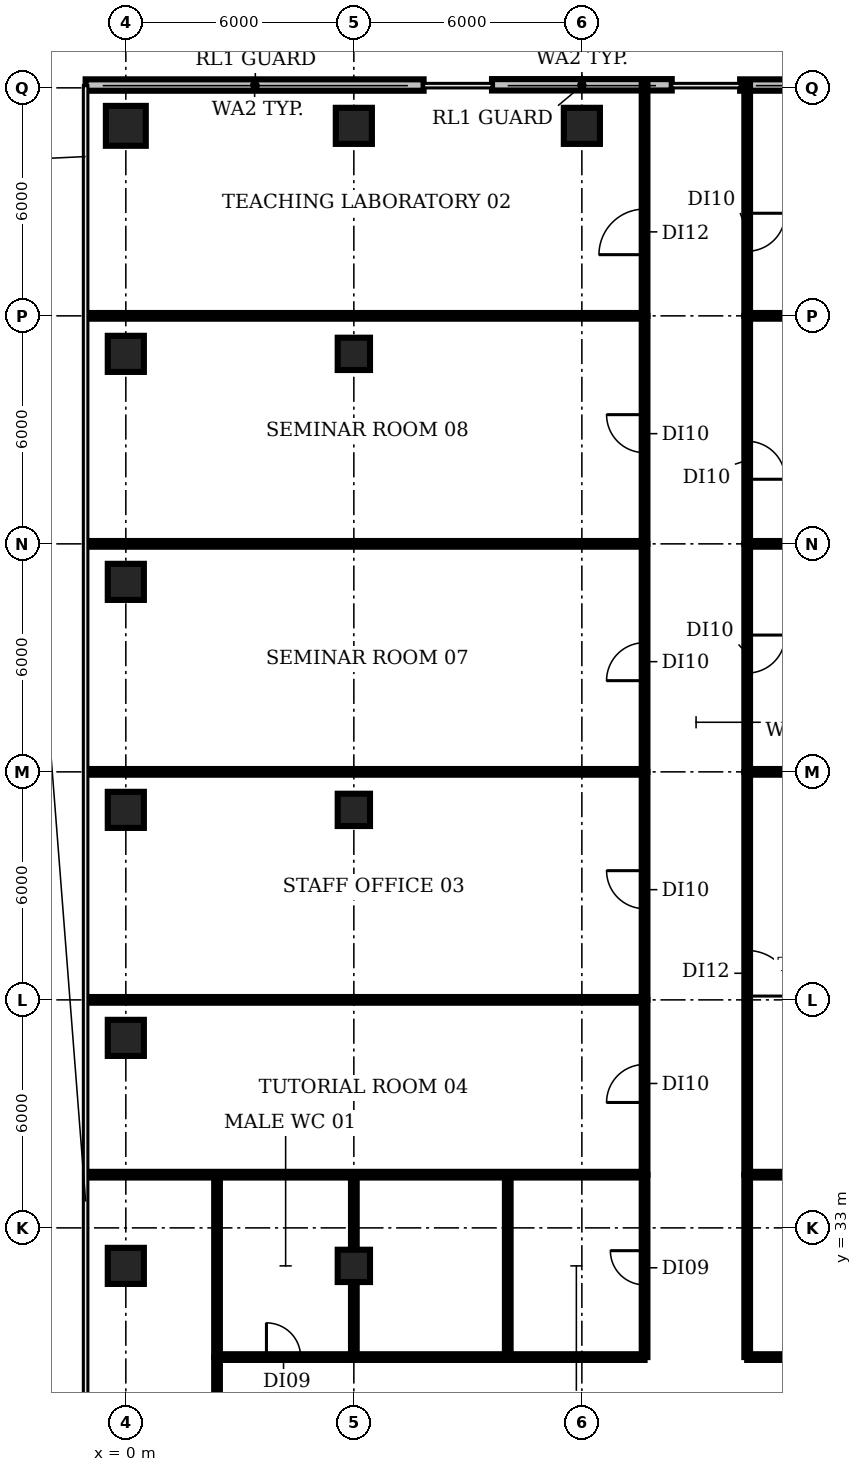
"""IFC4 building model, lengths in metres.
Left out: names, types, materials, properties, quantities, classifications, styles, units other than length and angle.
Written with IfcOpenShell. Run it as: python <this file> out.ifc"""

import sys

from ifc_helpers import new_model, si_unit, direction, frame, frame_2d, origin, origin_2d, place, context, subcontext, project, spatial, rectangle, circle, extrude, element, fill, save


model = new_model("IFC4")
c1 = context("Model", 3, precision=1e-05, world=origin(), true_north=direction((0.0, 1.0)))
c2 = subcontext(c1, "Body", "Model", "MODEL_VIEW")
j1 = project(units=[si_unit("LENGTHUNIT", "METRE"), si_unit("PLANEANGLEUNIT", "RADIAN")], contexts=[c1])
p1 = place(None, origin())
s1 = spatial("IfcSite", under=j1, at=p1, CompositionType="ELEMENT")
p2 = place(p1, origin())
s2 = spatial("IfcBuilding", under=s1, at=p2, CompositionType="ELEMENT")
p3 = place(p2, frame((0.0, 0.0, 66.8)))
s3 = spatial("IfcBuildingStorey", under=s2, at=p3, CompositionType="ELEMENT", Elevation=66.8)
for number, where, z_axis, x_axis in (
    (1, (0.0, 32.0, 0.0), (0.0, 0.0, 1.0), (1.0, 0.0, 0.0)),
    (2, (0.0, 38.0, 0.0), (0.0, 0.0, 1.0), (1.0, 0.0, 0.0)),
    (3, (0.0, 44.0, 0.0), (0.0, 0.0, 1.0), (1.0, 0.0, 0.0)),
    (4, (0.0, 50.0, 0.0), (0.0, 0.0, 1.0), (1.0, 0.0, 0.0)),
    (5, (0.0, 56.0, 0.0), (0.0, 0.0, 1.0), (1.0, 0.0, 0.0)),
):
    element("IfcColumn", number, at=place(p3, frame(where, z_axis=z_axis, x_axis=x_axis)), inside=s3, PredefinedType="COLUMN", context=c2, shape_type="SweptSolid", body=[
        extrude(rectangle(XDim=0.95, YDim=0.95, at=origin_2d()), origin(), (0.0, 0.0, 1.0), 3.85),
    ])
p4 = place(p3, frame((0.0, 62.0, 0.0), z_axis=(0.0, 0.0, 1.0), x_axis=(1.0, 0.0, 0.0)))
e6 = element("IfcColumn", 6, at=p4, inside=s3, PredefinedType="COLUMN", context=c2, shape_type="SweptSolid", body=[
    extrude(circle(Radius=0.525, at=origin_2d()), origin(), (0.0, 0.0, 1.0), 3.85),
])
for number, where, z_axis, x_axis in (
    (7, (6.0, 32.0, 0.0), (0.0, 0.0, 1.0), (1.0, 0.0, 0.0)),
    (8, (6.0, 44.0, 0.0), (0.0, 0.0, 1.0), (1.0, 0.0, 0.0)),
    (9, (6.0, 56.0, 0.0), (0.0, 0.0, 1.0), (1.0, 0.0, 0.0)),
):
    element("IfcColumn", number, at=place(p3, frame(where, z_axis=z_axis, x_axis=x_axis)), inside=s3, PredefinedType="COLUMN", context=c2, shape_type="SweptSolid", body=[
        extrude(rectangle(XDim=0.85, YDim=0.85, at=origin_2d()), origin(), (0.0, 0.0, 1.0), 3.85),
    ])
for number, where, z_axis, x_axis in (
    (10, (6.0, 62.0, 0.0), (0.0, 0.0, 1.0), (1.0, 0.0, 0.0)),
    (11, (12.0, 62.0, 0.0), (0.0, 0.0, 1.0), (1.0, 0.0, 0.0)),
):
    element("IfcColumn", number, at=place(p3, frame(where, z_axis=z_axis, x_axis=x_axis)), inside=s3, PredefinedType="COLUMN", context=c2, shape_type="SweptSolid", body=[
        extrude(rectangle(XDim=0.95, YDim=0.95, at=origin_2d()), origin(), (0.0, 0.0, 1.0), 3.85),
    ])
p5 = place(p3, frame((25.058, 63.074, 0.0), z_axis=(0.0, 0.0, 1.0), x_axis=(-1.0, 0.0, 0.0)))
e12 = element("IfcWall", 12, at=p5, inside=s3, PredefinedType="SOLIDWALL", context=c2, shape_type="SweptSolid", body=[
    extrude(rectangle(XDim=8.894, YDim=0.3, at=frame_2d((4.447, 0.0))), origin(), (0.0, 0.0, 1.0), 3.85),
])
p6 = place(p3, frame((14.365, 63.08, 0.0), z_axis=(0.0, 0.0, 1.0), x_axis=(-1.0, 0.0, 0.0)))
e13 = element("IfcWall", 13, at=p6, inside=s3, PredefinedType="SOLIDWALL", context=c2, shape_type="SweptSolid", body=[
    extrude(rectangle(XDim=4.729, YDim=0.3, at=frame_2d((2.365, 0.0))), origin(), (0.0, 0.0, 1.0), 3.85),
])
p7 = place(p3, frame((7.835, 63.074, 0.0), z_axis=(0.0, 0.0, 1.0), x_axis=(-1.0, 0.0, 0.0)))
e14 = element("IfcWall", 14, at=p7, inside=s3, PredefinedType="SOLIDWALL", context=c2, shape_type="SweptSolid", body=[
    extrude(rectangle(XDim=8.894, YDim=0.3, at=frame_2d((4.447, 0.0))), origin(), (0.0, 0.0, 1.0), 3.85),
])
for number, where, z_axis, x_axis in (
    (15, (-1.01, 34.4, 0.0), (0.0, 0.0, 1.0), (1.0, 0.0, 0.0)),
    (16, (-1.01, 39.0, 0.0), (0.0, 0.0, 1.0), (1.0, 0.0, 0.0)),
    (17, (-1.01, 45.0, 0.0), (0.0, 0.0, 1.0), (1.0, 0.0, 0.0)),
    (18, (-1.01, 51.0, 0.0), (0.0, 0.0, 1.0), (1.0, 0.0, 0.0)),
):
    element("IfcWall", number, at=place(p3, frame(where, z_axis=z_axis, x_axis=x_axis)), inside=s3, PredefinedType="PARTITIONING", context=c2, shape_type="SweptSolid", body=[
        extrude(rectangle(XDim=14.66, YDim=0.15, at=frame_2d((7.33, 0.0))), origin(), (0.0, 0.0, 1.0), 2.83),
    ])
p8 = place(p3, frame((-0.993, 57.0, 0.0), z_axis=(0.0, 0.0, 1.0), x_axis=(1.0, 0.0, 0.0)))
e19 = element("IfcWall", 19, at=p8, inside=s3, PredefinedType="PARTITIONING", context=c2, shape_type="SweptSolid", body=[
    extrude(rectangle(XDim=14.643, YDim=0.15, at=frame_2d((7.321, 0.0))), origin(), (0.0, 0.0, 1.0), 2.83),
])
p9 = place(p3, frame((2.4, 25.7, 0.0), z_axis=(0.0, 0.0, 1.0), x_axis=(0.0, 1.0, 0.0)))
e20 = element("IfcWall", 20, at=p9, inside=s3, PredefinedType="PARTITIONING", context=c2, shape_type="SweptSolid", body=[
    extrude(rectangle(XDim=3.9, YDim=0.15, at=frame_2d((1.95, 0.0))), origin(), (0.0, 0.0, 1.0), 2.83),
])
p10 = place(p3, frame((2.4, 29.6, 0.0), z_axis=(0.0, 0.0, 1.0), x_axis=(0.0, 1.0, 0.0)))
e21 = element("IfcWall", 21, at=p10, inside=s3, PredefinedType="PARTITIONING", context=c2, shape_type="SweptSolid", body=[
    extrude(rectangle(XDim=4.8, YDim=0.15, at=frame_2d((2.4, 0.0))), origin(), (0.0, 0.0, 1.0), 2.83),
])
p11 = place(p3, frame((2.4, 29.6, 0.0), z_axis=(0.0, 0.0, 1.0), x_axis=(1.0, 0.0, 0.0)))
e22 = element("IfcWall", 22, at=p11, inside=s3, PredefinedType="PARTITIONING", context=c2, shape_type="SweptSolid", body=[
    extrude(rectangle(XDim=3.6, YDim=0.15, at=frame_2d((1.8, 0.0))), origin(), (0.0, 0.0, 1.0), 2.83),
])
p12 = place(p11, frame((1.3, 0.0, 0.0)))
e23 = element("IfcOpeningElement", 23, at=p12, cuts=e22, PredefinedType="OPENING", context=c2, shape_type="SweptSolid", body=[
    extrude(rectangle(XDim=0.9, YDim=2.1, at=frame_2d((0.45, 1.05))), frame((0.0, 0.085, 0.0), z_axis=(0.0, -1.0, 0.0), x_axis=(1.0, 0.0, 0.0)), (0.0, 0.0, 1.0), 0.17),
])
p13 = place(p3, frame((6.0, 29.6, 0.0), z_axis=(0.0, 0.0, 1.0), x_axis=(0.0, 1.0, 0.0)))
e24 = element("IfcWall", 24, at=p13, inside=s3, PredefinedType="PARTITIONING", context=c2, shape_type="SweptSolid", body=[
    extrude(rectangle(XDim=4.8, YDim=0.15, at=frame_2d((2.4, 0.0))), origin(), (0.0, 0.0, 1.0), 2.83),
])
p14 = place(p3, frame((6.0, 29.6, 0.0), z_axis=(0.0, 0.0, 1.0), x_axis=(1.0, 0.0, 0.0)))
e25 = element("IfcWall", 25, at=p14, inside=s3, PredefinedType="PARTITIONING", context=c2, shape_type="SweptSolid", body=[
    extrude(rectangle(XDim=7.65, YDim=0.15, at=frame_2d((3.825, 0.0))), origin(), (0.0, 0.0, 1.0), 2.83),
])
p15 = place(p3, frame((10.05, 29.6, 0.0), z_axis=(0.0, 0.0, 1.0), x_axis=(0.0, 1.0, 0.0)))
e26 = element("IfcWall", 26, at=p15, inside=s3, PredefinedType="PARTITIONING", context=c2, shape_type="SweptSolid", body=[
    extrude(rectangle(XDim=4.8, YDim=0.15, at=frame_2d((2.4, 0.0))), origin(), (0.0, 0.0, 1.0), 2.83),
])
p16 = place(p3, frame((13.65, 29.6, 0.0), z_axis=(0.0, 0.0, 1.0), x_axis=(0.0, 1.0, 0.0)))
e27 = element("IfcWall", 27, at=p16, inside=s3, PredefinedType="PARTITIONING", context=c2, shape_type="SweptSolid", body=[
    extrude(rectangle(XDim=4.8, YDim=0.15, at=frame_2d((2.4, 0.0))), origin(), (0.0, 0.0, 1.0), 2.83),
])
p17 = place(p16, frame((1.9, 0.0, 0.0)))
e28 = element("IfcOpeningElement", 28, at=p17, cuts=e27, PredefinedType="OPENING", context=c2, shape_type="SweptSolid", body=[
    extrude(rectangle(XDim=0.9, YDim=2.1, at=frame_2d((0.45, 1.05))), frame((0.0, 0.085, 0.0), z_axis=(0.0, -1.0, 0.0), x_axis=(1.0, 0.0, 0.0)), (0.0, 0.0, 1.0), 0.17),
])
p18 = place(p3, frame((13.65, 34.4, 0.0), z_axis=(0.0, 0.0, 1.0), x_axis=(0.0, 1.0, 0.0)))
e29 = element("IfcWall", 29, at=p18, inside=s3, PredefinedType="PARTITIONING", context=c2, shape_type="SweptSolid", body=[
    extrude(rectangle(XDim=4.6, YDim=0.15, at=frame_2d((2.3, 0.0))), origin(), (0.0, 0.0, 1.0), 2.83),
])
p19 = place(p18, frame((1.9, 0.0, 0.0)))
e30 = element("IfcOpeningElement", 30, at=p19, cuts=e29, PredefinedType="OPENING", context=c2, shape_type="SweptSolid", body=[
    extrude(rectangle(XDim=1.0, YDim=2.1, at=frame_2d((0.5, 1.05))), frame((0.0, 0.085, 0.0), z_axis=(0.0, -1.0, 0.0), x_axis=(1.0, 0.0, 0.0)), (0.0, 0.0, 1.0), 0.17),
])
p20 = place(p3, frame((13.65, 39.0, 0.0), z_axis=(0.0, 0.0, 1.0), x_axis=(0.0, 1.0, 0.0)))
e31 = element("IfcWall", 31, at=p20, inside=s3, PredefinedType="PARTITIONING", context=c2, shape_type="SweptSolid", body=[
    extrude(rectangle(XDim=6.0, YDim=0.15, at=frame_2d((3.0, 0.0))), origin(), (0.0, 0.0, 1.0), 2.83),
])
p21 = place(p20, frame((2.4, 0.0, 0.0)))
e32 = element("IfcOpeningElement", 32, at=p21, cuts=e31, PredefinedType="OPENING", context=c2, shape_type="SweptSolid", body=[
    extrude(rectangle(XDim=1.0, YDim=2.1, at=frame_2d((0.5, 1.05))), frame((0.0, 0.085, 0.0), z_axis=(0.0, -1.0, 0.0), x_axis=(1.0, 0.0, 0.0)), (0.0, 0.0, 1.0), 0.17),
])
p22 = place(p3, frame((13.65, 45.0, 0.0), z_axis=(0.0, 0.0, 1.0), x_axis=(0.0, 1.0, 0.0)))
e33 = element("IfcWall", 33, at=p22, inside=s3, PredefinedType="PARTITIONING", context=c2, shape_type="SweptSolid", body=[
    extrude(rectangle(XDim=6.0, YDim=0.15, at=frame_2d((3.0, 0.0))), origin(), (0.0, 0.0, 1.0), 2.83),
])
p23 = place(p22, frame((2.4, 0.0, 0.0)))
e34 = element("IfcOpeningElement", 34, at=p23, cuts=e33, PredefinedType="OPENING", context=c2, shape_type="SweptSolid", body=[
    extrude(rectangle(XDim=1.0, YDim=2.1, at=frame_2d((0.5, 1.05))), frame((0.0, 0.085, 0.0), z_axis=(0.0, -1.0, 0.0), x_axis=(1.0, 0.0, 0.0)), (0.0, 0.0, 1.0), 0.17),
])
p24 = place(p3, frame((13.65, 51.0, 0.0), z_axis=(0.0, 0.0, 1.0), x_axis=(0.0, 1.0, 0.0)))
e35 = element("IfcWall", 35, at=p24, inside=s3, PredefinedType="PARTITIONING", context=c2, shape_type="SweptSolid", body=[
    extrude(rectangle(XDim=6.0, YDim=0.15, at=frame_2d((3.0, 0.0))), origin(), (0.0, 0.0, 1.0), 2.83),
])
p25 = place(p24, frame((2.4, 0.0, 0.0)))
e36 = element("IfcOpeningElement", 36, at=p25, cuts=e35, PredefinedType="OPENING", context=c2, shape_type="SweptSolid", body=[
    extrude(rectangle(XDim=1.0, YDim=2.1, at=frame_2d((0.5, 1.05))), frame((0.0, 0.085, 0.0), z_axis=(0.0, -1.0, 0.0), x_axis=(1.0, 0.0, 0.0)), (0.0, 0.0, 1.0), 0.17),
])
p26 = place(p3, frame((13.65, 57.0, 0.0), z_axis=(0.0, 0.0, 1.0), x_axis=(0.0, 1.0, 0.0)))
e37 = element("IfcWall", 37, at=p26, inside=s3, PredefinedType="PARTITIONING", context=c2, shape_type="SweptSolid", body=[
    extrude(rectangle(XDim=6.118, YDim=0.15, at=frame_2d((3.059, 0.0))), origin(), (0.0, 0.0, 1.0), 2.83),
])
p27 = place(p26, frame((1.61, 0.0, 0.0)))
e38 = element("IfcOpeningElement", 38, at=p27, cuts=e37, PredefinedType="OPENING", context=c2, shape_type="SweptSolid", body=[
    extrude(rectangle(XDim=1.2, YDim=2.1, at=frame_2d((0.6, 1.05))), frame((0.0, 0.085, 0.0), z_axis=(0.0, -1.0, 0.0), x_axis=(1.0, 0.0, 0.0)), (0.0, 0.0, 1.0), 0.17),
])
p28 = place(p3, frame((16.35, 29.6, 0.0), z_axis=(0.0, 0.0, 1.0), x_axis=(0.0, 1.0, 0.0)))
e39 = element("IfcWall", 39, at=p28, inside=s3, PredefinedType="PARTITIONING", context=c2, shape_type="SweptSolid", body=[
    extrude(rectangle(XDim=4.8, YDim=0.15, at=frame_2d((2.4, 0.0))), origin(), (0.0, 0.0, 1.0), 2.83),
])
p29 = place(p3, frame((16.35, 29.6, 0.0), z_axis=(0.0, 0.0, 1.0), x_axis=(1.0, 0.0, 0.0)))
e40 = element("IfcWall", 40, at=p29, inside=s3, PredefinedType="PARTITIONING", context=c2, shape_type="SweptSolid", body=[
    extrude(rectangle(XDim=5.06, YDim=0.15, at=frame_2d((2.53, 0.0))), origin(), (0.0, 0.0, 1.0), 2.83),
])
p30 = place(p3, frame((16.35, 34.4, 0.0), z_axis=(0.0, 0.0, 1.0), x_axis=(1.0, 0.0, 0.0)))
e41 = element("IfcWall", 41, at=p30, inside=s3, PredefinedType="PARTITIONING", context=c2, shape_type="SweptSolid", body=[
    extrude(rectangle(XDim=8.66, YDim=0.15, at=frame_2d((4.33, 0.0))), origin(), (0.0, 0.0, 1.0), 2.83),
])
p31 = place(p3, frame((16.35, 45.0, 0.0), z_axis=(0.0, 0.0, 1.0), x_axis=(0.0, -1.0, 0.0)))
e42 = element("IfcWall", 42, at=p31, inside=s3, PredefinedType="PARTITIONING", context=c2, shape_type="SweptSolid", body=[
    extrude(rectangle(XDim=10.6, YDim=0.15, at=frame_2d((5.3, 0.0))), origin(), (0.0, 0.0, 1.0), 2.83),
])
p32 = place(p31, frame((4.7, 0.0, 0.0)))
e43 = element("IfcOpeningElement", 43, at=p32, cuts=e42, PredefinedType="OPENING", context=c2, shape_type="SweptSolid", body=[
    extrude(rectangle(XDim=1.2, YDim=2.1, at=frame_2d((0.6, 1.05))), frame((0.0, 0.085, 0.0), z_axis=(0.0, -1.0, 0.0), x_axis=(1.0, 0.0, 0.0)), (0.0, 0.0, 1.0), 0.17),
])
p33 = place(p3, frame((16.35, 45.0, 0.0), z_axis=(0.0, 0.0, 1.0), x_axis=(1.0, 0.0, 0.0)))
e44 = element("IfcWall", 44, at=p33, inside=s3, PredefinedType="PARTITIONING", context=c2, shape_type="SweptSolid", body=[
    extrude(rectangle(XDim=8.66, YDim=0.15, at=frame_2d((4.33, 0.0))), origin(), (0.0, 0.0, 1.0), 2.83),
])
p34 = place(p3, frame((16.35, 51.0, 0.0), z_axis=(0.0, 0.0, 1.0), x_axis=(0.0, -1.0, 0.0)))
e45 = element("IfcWall", 45, at=p34, inside=s3, PredefinedType="PARTITIONING", context=c2, shape_type="SweptSolid", body=[
    extrude(rectangle(XDim=6.0, YDim=0.15, at=frame_2d((3.0, 0.0))), origin(), (0.0, 0.0, 1.0), 2.83),
])
p35 = place(p34, frame((2.4, 0.0, 0.0)))
e46 = element("IfcOpeningElement", 46, at=p35, cuts=e45, PredefinedType="OPENING", context=c2, shape_type="SweptSolid", body=[
    extrude(rectangle(XDim=1.0, YDim=2.1, at=frame_2d((0.5, 1.05))), frame((0.0, 0.085, 0.0), z_axis=(0.0, -1.0, 0.0), x_axis=(1.0, 0.0, 0.0)), (0.0, 0.0, 1.0), 0.17),
])
p36 = place(p3, frame((16.35, 51.0, 0.0), z_axis=(0.0, 0.0, 1.0), x_axis=(1.0, 0.0, 0.0)))
e47 = element("IfcWall", 47, at=p36, inside=s3, PredefinedType="PARTITIONING", context=c2, shape_type="SweptSolid", body=[
    extrude(rectangle(XDim=8.66, YDim=0.15, at=frame_2d((4.33, 0.0))), origin(), (0.0, 0.0, 1.0), 2.83),
])
p37 = place(p3, frame((16.35, 57.0, 0.0), z_axis=(0.0, 0.0, 1.0), x_axis=(0.0, -1.0, 0.0)))
e48 = element("IfcWall", 48, at=p37, inside=s3, PredefinedType="PARTITIONING", context=c2, shape_type="SweptSolid", body=[
    extrude(rectangle(XDim=6.0, YDim=0.15, at=frame_2d((3.0, 0.0))), origin(), (0.0, 0.0, 1.0), 2.83),
])
p38 = place(p37, frame((3.3, 0.0, 0.0)))
e49 = element("IfcOpeningElement", 49, at=p38, cuts=e48, PredefinedType="OPENING", context=c2, shape_type="SweptSolid", body=[
    extrude(rectangle(XDim=1.0, YDim=2.1, at=frame_2d((0.5, 1.05))), frame((0.0, 0.085, 0.0), z_axis=(0.0, -1.0, 0.0), x_axis=(1.0, 0.0, 0.0)), (0.0, 0.0, 1.0), 0.17),
])
p39 = place(p3, frame((16.35, 57.0, 0.0), z_axis=(0.0, 0.0, 1.0), x_axis=(1.0, 0.0, 0.0)))
e50 = element("IfcWall", 50, at=p39, inside=s3, PredefinedType="PARTITIONING", context=c2, shape_type="SweptSolid", body=[
    extrude(rectangle(XDim=8.643, YDim=0.15, at=frame_2d((4.321, 0.0))), origin(), (0.0, 0.0, 1.0), 2.83),
])
p40 = place(p3, frame((16.35, 63.118, 0.0), z_axis=(0.0, 0.0, 1.0), x_axis=(0.0, -1.0, 0.0)))
e51 = element("IfcWall", 51, at=p40, inside=s3, PredefinedType="PARTITIONING", context=c2, shape_type="SweptSolid", body=[
    extrude(rectangle(XDim=6.118, YDim=0.15, at=frame_2d((3.059, 0.0))), origin(), (0.0, 0.0, 1.0), 2.83),
])
p41 = place(p40, frame((3.418, 0.0, 0.0)))
e52 = element("IfcOpeningElement", 52, at=p41, cuts=e51, PredefinedType="OPENING", context=c2, shape_type="SweptSolid", body=[
    extrude(rectangle(XDim=1.0, YDim=2.1, at=frame_2d((0.5, 1.05))), frame((0.0, 0.085, 0.0), z_axis=(0.0, -1.0, 0.0), x_axis=(1.0, 0.0, 0.0)), (0.0, 0.0, 1.0), 0.17),
])
p42 = place(p12, origin())
e53 = element("IfcDoor", 53, at=p42, inside=s3, OperationType="SINGLE_SWING_LEFT", PredefinedType="DOOR", context=c2, shape_type="SweptSolid", body=[
    extrude(rectangle(XDim=0.9, YDim=2.1, at=frame_2d((0.45, 1.05))), frame((0.0, 0.025, 0.0), z_axis=(0.0, -1.0, 0.0), x_axis=(1.0, 0.0, 0.0)), (0.0, 0.0, 1.0), 0.05),
])
fill(e23, e53)
p43 = place(p17, origin())
e54 = element("IfcDoor", 54, at=p43, inside=s3, OperationType="SINGLE_SWING_RIGHT", PredefinedType="DOOR", context=c2, shape_type="SweptSolid", body=[
    extrude(rectangle(XDim=0.9, YDim=2.1, at=frame_2d((0.45, 1.05))), frame((0.0, 0.025, 0.0), z_axis=(0.0, -1.0, 0.0), x_axis=(1.0, 0.0, 0.0)), (0.0, 0.0, 1.0), 0.05),
])
fill(e28, e54)
p44 = place(p19, origin())
e55 = element("IfcDoor", 55, at=p44, inside=s3, OperationType="SINGLE_SWING_LEFT", PredefinedType="DOOR", context=c2, shape_type="SweptSolid", body=[
    extrude(rectangle(XDim=1.0, YDim=2.1, at=frame_2d((0.5, 1.05))), frame((0.0, 0.025, 0.0), z_axis=(0.0, -1.0, 0.0), x_axis=(1.0, 0.0, 0.0)), (0.0, 0.0, 1.0), 0.05),
])
fill(e30, e55)
p45 = place(p21, origin())
e56 = element("IfcDoor", 56, at=p45, inside=s3, OperationType="SINGLE_SWING_RIGHT", PredefinedType="DOOR", context=c2, shape_type="SweptSolid", body=[
    extrude(rectangle(XDim=1.0, YDim=2.1, at=frame_2d((0.5, 1.05))), frame((0.0, 0.025, 0.0), z_axis=(0.0, -1.0, 0.0), x_axis=(1.0, 0.0, 0.0)), (0.0, 0.0, 1.0), 0.05),
])
fill(e32, e56)
p46 = place(p23, origin())
e57 = element("IfcDoor", 57, at=p46, inside=s3, OperationType="SINGLE_SWING_LEFT", PredefinedType="DOOR", context=c2, shape_type="SweptSolid", body=[
    extrude(rectangle(XDim=1.0, YDim=2.1, at=frame_2d((0.5, 1.05))), frame((0.0, 0.025, 0.0), z_axis=(0.0, -1.0, 0.0), x_axis=(1.0, 0.0, 0.0)), (0.0, 0.0, 1.0), 0.05),
])
fill(e34, e57)
p47 = place(p25, origin())
e58 = element("IfcDoor", 58, at=p47, inside=s3, OperationType="SINGLE_SWING_RIGHT", PredefinedType="DOOR", context=c2, shape_type="SweptSolid", body=[
    extrude(rectangle(XDim=1.0, YDim=2.1, at=frame_2d((0.5, 1.05))), frame((0.0, 0.025, 0.0), z_axis=(0.0, -1.0, 0.0), x_axis=(1.0, 0.0, 0.0)), (0.0, 0.0, 1.0), 0.05),
])
fill(e36, e58)
p48 = place(p27, origin())
e59 = element("IfcDoor", 59, at=p48, inside=s3, OperationType="SINGLE_SWING_LEFT", PredefinedType="DOOR", context=c2, shape_type="SweptSolid", body=[
    extrude(rectangle(XDim=1.2, YDim=2.1, at=frame_2d((0.6, 1.05))), frame((0.0, 0.025, 0.0), z_axis=(0.0, -1.0, 0.0), x_axis=(1.0, 0.0, 0.0)), (0.0, 0.0, 1.0), 0.05),
])
fill(e38, e59)
p49 = place(p32, origin())
e60 = element("IfcDoor", 60, at=p49, inside=s3, OperationType="SINGLE_SWING_RIGHT", PredefinedType="DOOR", context=c2, shape_type="SweptSolid", body=[
    extrude(rectangle(XDim=1.2, YDim=2.1, at=frame_2d((0.6, 1.05))), frame((0.0, 0.025, 0.0), z_axis=(0.0, -1.0, 0.0), x_axis=(1.0, 0.0, 0.0)), (0.0, 0.0, 1.0), 0.05),
])
fill(e43, e60)
p50 = place(p35, origin())
e61 = element("IfcDoor", 61, at=p50, inside=s3, OperationType="SINGLE_SWING_LEFT", PredefinedType="DOOR", context=c2, shape_type="SweptSolid", body=[
    extrude(rectangle(XDim=1.0, YDim=2.1, at=frame_2d((0.5, 1.05))), frame((0.0, 0.025, 0.0), z_axis=(0.0, -1.0, 0.0), x_axis=(1.0, 0.0, 0.0)), (0.0, 0.0, 1.0), 0.05),
])
fill(e46, e61)
p51 = place(p38, origin())
e62 = element("IfcDoor", 62, at=p51, inside=s3, OperationType="SINGLE_SWING_RIGHT", PredefinedType="DOOR", context=c2, shape_type="SweptSolid", body=[
    extrude(rectangle(XDim=1.0, YDim=2.1, at=frame_2d((0.5, 1.05))), frame((0.0, 0.025, 0.0), z_axis=(0.0, -1.0, 0.0), x_axis=(1.0, 0.0, 0.0)), (0.0, 0.0, 1.0), 0.05),
])
fill(e49, e62)
p52 = place(p41, origin())
e63 = element("IfcDoor", 63, at=p52, inside=s3, OperationType="SINGLE_SWING_LEFT", PredefinedType="DOOR", context=c2, shape_type="SweptSolid", body=[
    extrude(rectangle(XDim=1.0, YDim=2.1, at=frame_2d((0.5, 1.05))), frame((0.0, 0.025, 0.0), z_axis=(0.0, -1.0, 0.0), x_axis=(1.0, 0.0, 0.0)), (0.0, 0.0, 1.0), 0.05),
])
fill(e52, e63)
save(model, sys.argv[1])
